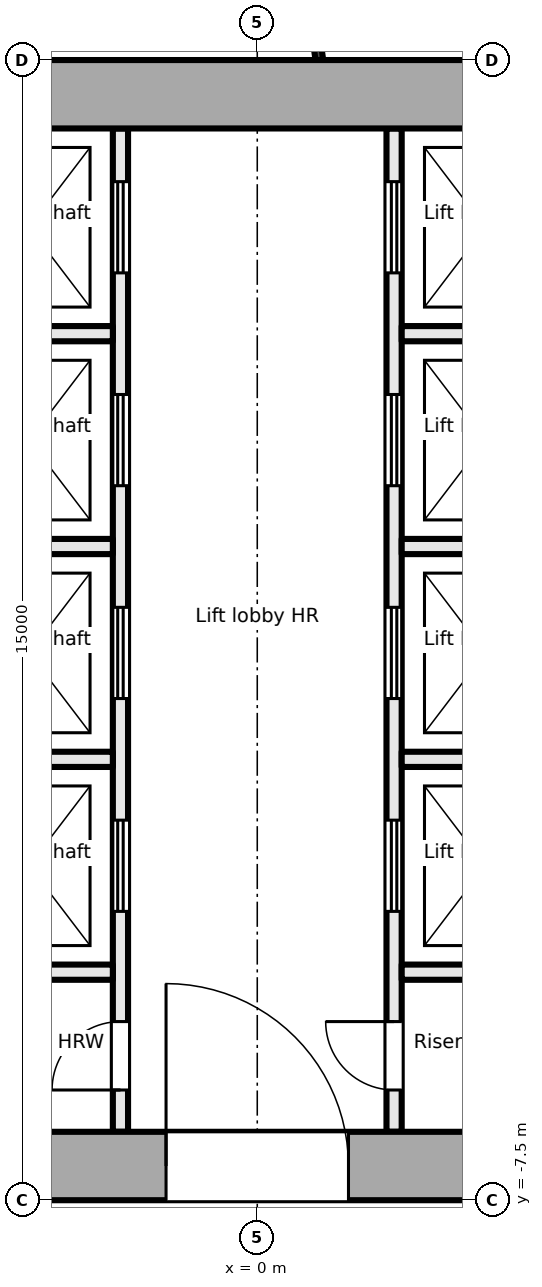
"""IFC4 building model, lengths in metres.
Left out: names, types, materials, properties, quantities, classifications, styles, units other than length and angle.
Written with IfcOpenShell. Run it as: python <this file> out.ifc"""

import sys

from ifc_helpers import new_model, si_unit, direction, frame, frame_2d, origin, place, context, subcontext, project, spatial, rectangle, extrude, element, fill, save


model = new_model("IFC4")
c1 = context("Model", 3, precision=1e-05, world=origin(), true_north=direction((0.0, 1.0)))
c2 = subcontext(c1, "Body", "Model", "MODEL_VIEW")
j1 = project(units=[si_unit("LENGTHUNIT", "METRE"), si_unit("PLANEANGLEUNIT", "RADIAN")], contexts=[c1])
p1 = place(None, origin())
s1 = spatial("IfcSite", under=j1, at=p1, CompositionType="ELEMENT")
p2 = place(p1, origin())
s2 = spatial("IfcBuilding", under=s1, at=p2, CompositionType="ELEMENT")
p3 = place(p2, frame((0.0, 0.0, 168.5)))
s3 = spatial("IfcBuildingStorey", under=s2, at=p3, CompositionType="ELEMENT", Elevation=168.5)
p4 = place(p3, frame((-18.0, -7.05, -0.2), z_axis=(0.0, 0.0, 1.0), x_axis=(1.0, 0.0, 0.0)))
e1 = element("IfcWall", 1, at=p4, inside=s3, PredefinedType="SHEAR", context=c2, shape_type="SweptSolid", body=[
    extrude(rectangle(XDim=36.0, YDim=0.9, at=frame_2d((18.0, 0.0))), origin(), (0.0, 0.0, 1.0), 3.9),
])
p5 = place(p4, frame((8.1, 0.0, 0.2)))
e2 = element("IfcOpeningElement", 2, at=p5, cuts=e1, PredefinedType="OPENING", context=c2, shape_type="SweptSolid", body=[
    extrude(rectangle(XDim=1.8, YDim=2.1, at=frame_2d((0.9, 1.05))), frame((0.0, 0.46, 0.0), z_axis=(0.0, -1.0, 0.0), x_axis=(1.0, 0.0, 0.0)), (0.0, 0.0, 1.0), 0.921),
])
p6 = place(p4, frame((16.8, 0.0, 0.2)))
e3 = element("IfcOpeningElement", 3, at=p6, cuts=e1, PredefinedType="OPENING", context=c2, shape_type="SweptSolid", body=[
    extrude(rectangle(XDim=2.4, YDim=2.1, at=frame_2d((1.2, 1.05))), frame((0.0, 0.46, 0.0), z_axis=(0.0, -1.0, 0.0), x_axis=(1.0, 0.0, 0.0)), (0.0, 0.0, 1.0), 0.921),
])
p7 = place(p4, frame((26.1, 0.0, 0.2)))
e4 = element("IfcOpeningElement", 4, at=p7, cuts=e1, PredefinedType="OPENING", context=c2, shape_type="SweptSolid", body=[
    extrude(rectangle(XDim=2.4, YDim=2.1, at=frame_2d((1.2, 1.05))), frame((0.0, 0.46, 0.0), z_axis=(0.0, -1.0, 0.0), x_axis=(1.0, 0.0, 0.0)), (0.0, 0.0, 1.0), 0.921),
])
p8 = place(p3, frame((-18.0, 7.05, -0.2), z_axis=(0.0, 0.0, 1.0), x_axis=(1.0, 0.0, 0.0)))
e5 = element("IfcWall", 5, at=p8, inside=s3, PredefinedType="SHEAR", context=c2, shape_type="SweptSolid", body=[
    extrude(rectangle(XDim=36.0, YDim=0.9, at=frame_2d((18.0, 0.0))), origin(), (0.0, 0.0, 1.0), 3.9),
])
p9 = place(p3, frame((-1.8, -6.6, 0.0), z_axis=(0.0, 0.0, 1.0), x_axis=(0.0, 1.0, 0.0)))
e6 = element("IfcWall", 6, at=p9, inside=s3, PredefinedType="PARTITIONING", context=c2, shape_type="SweptSolid", body=[
    extrude(rectangle(XDim=13.2, YDim=0.2, at=frame_2d((6.6, 0.0))), origin(), (0.0, 0.0, 1.0), 3.7),
])
p10 = place(p9, frame((0.55, 0.0, 0.0)))
e7 = element("IfcOpeningElement", 7, at=p10, cuts=e6, PredefinedType="OPENING", context=c2, shape_type="SweptSolid", body=[
    extrude(rectangle(XDim=0.9, YDim=2.1, at=frame_2d((0.45, 1.05))), frame((0.0, 0.111, 0.0), z_axis=(0.0, -1.0, 0.0), x_axis=(1.0, 0.0, 0.0)), (0.0, 0.0, 1.0), 0.221),
])
p11 = place(p9, frame((2.9, 0.0, 0.0)))
e8 = element("IfcOpeningElement", 8, at=p11, cuts=e6, PredefinedType="OPENING", context=c2, shape_type="SweptSolid", body=[
    extrude(rectangle(XDim=1.2, YDim=2.1, at=frame_2d((0.6, 1.05))), frame((0.0, 0.111, 0.0), z_axis=(0.0, -1.0, 0.0), x_axis=(1.0, 0.0, 0.0)), (0.0, 0.0, 1.0), 0.221),
])
p12 = place(p9, frame((5.7, 0.0, 0.0)))
e9 = element("IfcOpeningElement", 9, at=p12, cuts=e6, PredefinedType="OPENING", context=c2, shape_type="SweptSolid", body=[
    extrude(rectangle(XDim=1.2, YDim=2.1, at=frame_2d((0.6, 1.05))), frame((0.0, 0.111, 0.0), z_axis=(0.0, -1.0, 0.0), x_axis=(1.0, 0.0, 0.0)), (0.0, 0.0, 1.0), 0.221),
])
p13 = place(p9, frame((8.5, 0.0, 0.0)))
e10 = element("IfcOpeningElement", 10, at=p13, cuts=e6, PredefinedType="OPENING", context=c2, shape_type="SweptSolid", body=[
    extrude(rectangle(XDim=1.2, YDim=2.1, at=frame_2d((0.6, 1.05))), frame((0.0, 0.111, 0.0), z_axis=(0.0, -1.0, 0.0), x_axis=(1.0, 0.0, 0.0)), (0.0, 0.0, 1.0), 0.221),
])
p14 = place(p9, frame((11.3, 0.0, 0.0)))
e11 = element("IfcOpeningElement", 11, at=p14, cuts=e6, PredefinedType="OPENING", context=c2, shape_type="SweptSolid", body=[
    extrude(rectangle(XDim=1.2, YDim=2.1, at=frame_2d((0.6, 1.05))), frame((0.0, 0.111, 0.0), z_axis=(0.0, -1.0, 0.0), x_axis=(1.0, 0.0, 0.0)), (0.0, 0.0, 1.0), 0.221),
])
p15 = place(p3, frame((1.8, -6.6, 0.0), z_axis=(0.0, 0.0, 1.0), x_axis=(0.0, 1.0, 0.0)))
e12 = element("IfcWall", 12, at=p15, inside=s3, PredefinedType="PARTITIONING", context=c2, shape_type="SweptSolid", body=[
    extrude(rectangle(XDim=13.2, YDim=0.2, at=frame_2d((6.6, 0.0))), origin(), (0.0, 0.0, 1.0), 3.7),
])
p16 = place(p15, frame((0.55, 0.0, 0.0)))
e13 = element("IfcOpeningElement", 13, at=p16, cuts=e12, PredefinedType="OPENING", context=c2, shape_type="SweptSolid", body=[
    extrude(rectangle(XDim=0.9, YDim=2.1, at=frame_2d((0.45, 1.05))), frame((0.0, 0.111, 0.0), z_axis=(0.0, -1.0, 0.0), x_axis=(1.0, 0.0, 0.0)), (0.0, 0.0, 1.0), 0.221),
])
p17 = place(p15, frame((2.9, 0.0, 0.0)))
e14 = element("IfcOpeningElement", 14, at=p17, cuts=e12, PredefinedType="OPENING", context=c2, shape_type="SweptSolid", body=[
    extrude(rectangle(XDim=1.2, YDim=2.1, at=frame_2d((0.6, 1.05))), frame((0.0, 0.111, 0.0), z_axis=(0.0, -1.0, 0.0), x_axis=(1.0, 0.0, 0.0)), (0.0, 0.0, 1.0), 0.221),
])
p18 = place(p15, frame((5.7, 0.0, 0.0)))
e15 = element("IfcOpeningElement", 15, at=p18, cuts=e12, PredefinedType="OPENING", context=c2, shape_type="SweptSolid", body=[
    extrude(rectangle(XDim=1.2, YDim=2.1, at=frame_2d((0.6, 1.05))), frame((0.0, 0.111, 0.0), z_axis=(0.0, -1.0, 0.0), x_axis=(1.0, 0.0, 0.0)), (0.0, 0.0, 1.0), 0.221),
])
p19 = place(p15, frame((8.5, 0.0, 0.0)))
e16 = element("IfcOpeningElement", 16, at=p19, cuts=e12, PredefinedType="OPENING", context=c2, shape_type="SweptSolid", body=[
    extrude(rectangle(XDim=1.2, YDim=2.1, at=frame_2d((0.6, 1.05))), frame((0.0, 0.111, 0.0), z_axis=(0.0, -1.0, 0.0), x_axis=(1.0, 0.0, 0.0)), (0.0, 0.0, 1.0), 0.221),
])
p20 = place(p15, frame((11.3, 0.0, 0.0)))
e17 = element("IfcOpeningElement", 17, at=p20, cuts=e12, PredefinedType="OPENING", context=c2, shape_type="SweptSolid", body=[
    extrude(rectangle(XDim=1.2, YDim=2.1, at=frame_2d((0.6, 1.05))), frame((0.0, 0.111, 0.0), z_axis=(0.0, -1.0, 0.0), x_axis=(1.0, 0.0, 0.0)), (0.0, 0.0, 1.0), 0.221),
])
for number, where, z_axis, x_axis in (
    (18, (-4.2, -1.7, 0.0), (0.0, 0.0, 1.0), (1.0, 0.0, 0.0)),
    (19, (-4.2, 1.1, 0.0), (0.0, 0.0, 1.0), (1.0, 0.0, 0.0)),
    (20, (-4.2, 3.9, 0.0), (0.0, 0.0, 1.0), (1.0, 0.0, 0.0)),
    (21, (-4.2, -4.5, 0.0), (0.0, 0.0, 1.0), (1.0, 0.0, 0.0)),
    (22, (1.9, -1.7, 0.0), (0.0, 0.0, 1.0), (1.0, 0.0, 0.0)),
    (23, (1.9, 1.1, 0.0), (0.0, 0.0, 1.0), (1.0, 0.0, 0.0)),
    (24, (1.9, 3.9, 0.0), (0.0, 0.0, 1.0), (1.0, 0.0, 0.0)),
    (25, (1.9, -4.5, 0.0), (0.0, 0.0, 1.0), (1.0, 0.0, 0.0)),
):
    element("IfcWall", number, at=place(p3, frame(where, z_axis=z_axis, x_axis=x_axis)), inside=s3, PredefinedType="PARTITIONING", context=c2, shape_type="SweptSolid", body=[
        extrude(rectangle(XDim=2.3, YDim=0.2, at=frame_2d((1.15, 0.0))), origin(), (0.0, 0.0, 1.0), 3.7),
    ])
p21 = place(p3, frame((0.817, 7.5, 0.0), z_axis=(0.0, 0.0, 1.0), x_axis=(-0.139230432727, 0.990260009595, 0.0)))
e26 = element("IfcWall", 26, at=p21, inside=s3, PredefinedType="PARTITIONING", context=c2, shape_type="SweptSolid", body=[
    extrude(rectangle(XDim=3.526, YDim=0.1, at=frame_2d((1.763, 0.0))), origin(), (0.0, 0.0, 1.0), 3.7),
])
p22 = place(p10, origin())
e27 = element("IfcDoor", 27, at=p22, inside=s3, OperationType="SINGLE_SWING_LEFT", PredefinedType="DOOR", context=c2, shape_type="SweptSolid", body=[
    extrude(rectangle(XDim=0.9, YDim=2.1, at=frame_2d((0.45, 1.05))), frame((0.0, 0.025, 0.0), z_axis=(0.0, -1.0, 0.0), x_axis=(1.0, 0.0, 0.0)), (0.0, 0.0, 1.0), 0.05),
])
fill(e7, e27)
p23 = place(p11, origin())
e28 = element("IfcDoor", 28, at=p23, inside=s3, OperationType="DOUBLE_DOOR_SLIDING", PredefinedType="DOOR", context=c2, shape_type="SweptSolid", body=[
    extrude(rectangle(XDim=1.2, YDim=2.1, at=frame_2d((0.6, 1.05))), frame((0.0, 0.025, 0.0), z_axis=(0.0, -1.0, 0.0), x_axis=(1.0, 0.0, 0.0)), (0.0, 0.0, 1.0), 0.05),
])
fill(e8, e28)
p24 = place(p12, origin())
e29 = element("IfcDoor", 29, at=p24, inside=s3, OperationType="DOUBLE_DOOR_SLIDING", PredefinedType="DOOR", context=c2, shape_type="SweptSolid", body=[
    extrude(rectangle(XDim=1.2, YDim=2.1, at=frame_2d((0.6, 1.05))), frame((0.0, 0.025, 0.0), z_axis=(0.0, -1.0, 0.0), x_axis=(1.0, 0.0, 0.0)), (0.0, 0.0, 1.0), 0.05),
])
fill(e9, e29)
p25 = place(p13, origin())
e30 = element("IfcDoor", 30, at=p25, inside=s3, OperationType="DOUBLE_DOOR_SLIDING", PredefinedType="DOOR", context=c2, shape_type="SweptSolid", body=[
    extrude(rectangle(XDim=1.2, YDim=2.1, at=frame_2d((0.6, 1.05))), frame((0.0, 0.025, 0.0), z_axis=(0.0, -1.0, 0.0), x_axis=(1.0, 0.0, 0.0)), (0.0, 0.0, 1.0), 0.05),
])
fill(e10, e30)
p26 = place(p14, origin())
e31 = element("IfcDoor", 31, at=p26, inside=s3, OperationType="DOUBLE_DOOR_SLIDING", PredefinedType="DOOR", context=c2, shape_type="SweptSolid", body=[
    extrude(rectangle(XDim=1.2, YDim=2.1, at=frame_2d((0.6, 1.05))), frame((0.0, 0.025, 0.0), z_axis=(0.0, -1.0, 0.0), x_axis=(1.0, 0.0, 0.0)), (0.0, 0.0, 1.0), 0.05),
])
fill(e11, e31)
p27 = place(p16, origin())
e32 = element("IfcDoor", 32, at=p27, inside=s3, OperationType="SINGLE_SWING_RIGHT", PredefinedType="DOOR", context=c2, shape_type="SweptSolid", body=[
    extrude(rectangle(XDim=0.9, YDim=2.1, at=frame_2d((0.45, 1.05))), frame((0.0, 0.025, 0.0), z_axis=(0.0, -1.0, 0.0), x_axis=(1.0, 0.0, 0.0)), (0.0, 0.0, 1.0), 0.05),
])
fill(e13, e32)
p28 = place(p17, origin())
e33 = element("IfcDoor", 33, at=p28, inside=s3, OperationType="DOUBLE_DOOR_SLIDING", PredefinedType="DOOR", context=c2, shape_type="SweptSolid", body=[
    extrude(rectangle(XDim=1.2, YDim=2.1, at=frame_2d((0.6, 1.05))), frame((0.0, 0.025, 0.0), z_axis=(0.0, -1.0, 0.0), x_axis=(1.0, 0.0, 0.0)), (0.0, 0.0, 1.0), 0.05),
])
fill(e14, e33)
p29 = place(p18, origin())
e34 = element("IfcDoor", 34, at=p29, inside=s3, OperationType="DOUBLE_DOOR_SLIDING", PredefinedType="DOOR", context=c2, shape_type="SweptSolid", body=[
    extrude(rectangle(XDim=1.2, YDim=2.1, at=frame_2d((0.6, 1.05))), frame((0.0, 0.025, 0.0), z_axis=(0.0, -1.0, 0.0), x_axis=(1.0, 0.0, 0.0)), (0.0, 0.0, 1.0), 0.05),
])
fill(e15, e34)
p30 = place(p19, origin())
e35 = element("IfcDoor", 35, at=p30, inside=s3, OperationType="DOUBLE_DOOR_SLIDING", PredefinedType="DOOR", context=c2, shape_type="SweptSolid", body=[
    extrude(rectangle(XDim=1.2, YDim=2.1, at=frame_2d((0.6, 1.05))), frame((0.0, 0.025, 0.0), z_axis=(0.0, -1.0, 0.0), x_axis=(1.0, 0.0, 0.0)), (0.0, 0.0, 1.0), 0.05),
])
fill(e16, e35)
p31 = place(p20, origin())
e36 = element("IfcDoor", 36, at=p31, inside=s3, OperationType="DOUBLE_DOOR_SLIDING", PredefinedType="DOOR", context=c2, shape_type="SweptSolid", body=[
    extrude(rectangle(XDim=1.2, YDim=2.1, at=frame_2d((0.6, 1.05))), frame((0.0, 0.025, 0.0), z_axis=(0.0, -1.0, 0.0), x_axis=(1.0, 0.0, 0.0)), (0.0, 0.0, 1.0), 0.05),
])
fill(e17, e36)
p32 = place(p6, origin())
e37 = element("IfcDoor", 37, at=p32, inside=s3, OperationType="DOUBLE_DOOR_DOUBLE_SWING", PredefinedType="DOOR", context=c2, shape_type="SweptSolid", body=[
    extrude(rectangle(XDim=2.4, YDim=2.1, at=frame_2d((1.2, 1.05))), frame((0.0, 0.025, 0.0), z_axis=(0.0, -1.0, 0.0), x_axis=(1.0, 0.0, 0.0)), (0.0, 0.0, 1.0), 0.05),
])
fill(e3, e37)
save(model, sys.argv[1])
